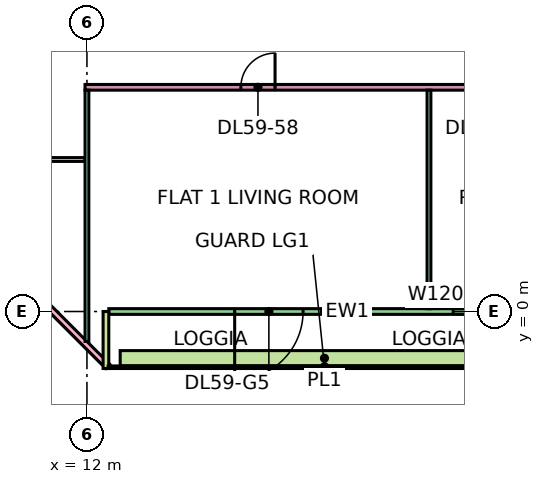
"""IFC4 building model, lengths in metres.
Left out: names, types, materials, properties, quantities, classifications, styles, units other than length and angle.
Written with IfcOpenShell. Run it as: python <this file> out.ifc"""

import sys

from ifc_helpers import new_model, si_unit, direction, frame, frame_2d, origin, place, context, subcontext, project, spatial, rectangle, extrude, element, fill, save


model = new_model("IFC4")
c1 = context("Model", 3, precision=1e-05, world=origin(), true_north=direction((0.0, 1.0)))
c2 = subcontext(c1, "Body", "Model", "MODEL_VIEW")
j1 = project(units=[si_unit("LENGTHUNIT", "METRE"), si_unit("PLANEANGLEUNIT", "RADIAN")], contexts=[c1])
p1 = place(None, origin())
s1 = spatial("IfcSite", under=j1, at=p1, CompositionType="ELEMENT")
p2 = place(p1, origin())
s2 = spatial("IfcBuilding", under=s1, at=p2, CompositionType="ELEMENT")
p3 = place(p2, frame((0.0, 0.0, 249.15)))
s3 = spatial("IfcBuildingStorey", under=s2, at=p3, CompositionType="ELEMENT", Elevation=249.15)
p4 = place(p3, frame((-1.447, 12.553, 0.0), z_axis=(0.0, 0.0, 1.0), x_axis=(0.707106781187, -0.707106781187, 0.0)))
e1 = element("IfcWall", 1, at=p4, inside=s3, PredefinedType="SOLIDWALL", context=c2, shape_type="SweptSolid", body=[
    extrude(rectangle(XDim=19.799, YDim=0.15, at=frame_2d((9.899, 0.0))), origin(), (0.0, 0.0, 1.0), 3.35),
])
p5 = place(p4, frame((2.212, 0.0, 0.45)))
e2 = element("IfcOpeningElement", 2, at=p5, cuts=e1, PredefinedType="OPENING", context=c2, shape_type="SweptSolid", body=[
    extrude(rectangle(XDim=3.0, YDim=2.4, at=frame_2d((1.5, 1.2))), frame((0.0, 0.085, 0.0), z_axis=(0.0, -1.0, 0.0), x_axis=(1.0, 0.0, 0.0)), (0.0, 0.0, 1.0), 0.17),
])
p6 = place(p4, frame((10.216, 0.0, 0.45)))
e3 = element("IfcOpeningElement", 3, at=p6, cuts=e1, PredefinedType="OPENING", context=c2, shape_type="SweptSolid", body=[
    extrude(rectangle(XDim=3.0, YDim=2.4, at=frame_2d((1.5, 1.2))), frame((0.0, 0.085, 0.0), z_axis=(0.0, -1.0, 0.0), x_axis=(1.0, 0.0, 0.0)), (0.0, 0.0, 1.0), 0.17),
])
p7 = place(p3, frame((12.575, 0.0, 0.0), z_axis=(0.0, 0.0, 1.0), x_axis=(1.0, 0.0, 0.0)))
e4 = element("IfcWall", 4, at=p7, inside=s3, PredefinedType="SOLIDWALL", context=c2, shape_type="SweptSolid", body=[
    extrude(rectangle(XDim=11.35, YDim=0.15, at=frame_2d((5.675, 0.0))), origin(), (0.0, 0.0, 1.0), 3.35),
])
p8 = place(p7, frame((3.312, 0.0, 0.0)))
e5 = element("IfcOpeningElement", 5, at=p8, cuts=e4, PredefinedType="OPENING", context=c2, shape_type="SweptSolid", body=[
    extrude(rectangle(XDim=1.8, YDim=2.4, at=frame_2d((0.9, 1.2))), frame((0.0, 0.085, 0.0), z_axis=(0.0, -1.0, 0.0), x_axis=(1.0, 0.0, 0.0)), (0.0, 0.0, 1.0), 0.17),
])
p9 = place(p7, frame((9.062, 0.0, 0.45)))
e6 = element("IfcOpeningElement", 6, at=p9, cuts=e4, PredefinedType="OPENING", context=c2, shape_type="SweptSolid", body=[
    extrude(rectangle(XDim=1.2, YDim=2.4, at=frame_2d((0.6, 1.2))), frame((0.0, 0.085, 0.0), z_axis=(0.0, -1.0, 0.0), x_axis=(1.0, 0.0, 0.0)), (0.0, 0.0, 1.0), 0.17),
])
p10 = place(p3, frame((12.5, -1.5, 0.0), z_axis=(0.0, 0.0, 1.0), x_axis=(0.0, 1.0, 0.0)))
e7 = element("IfcWall", 7, at=p10, inside=s3, PredefinedType="SOLIDWALL", context=c2, shape_type="SweptSolid", body=[
    extrude(rectangle(XDim=1.5, YDim=0.15, at=frame_2d((0.75, 0.0))), origin(), (0.0, 0.0, 1.0), 3.35),
])
p11 = place(p3, frame((12.875, -1.229, 0.0), z_axis=(0.0, 0.0, 1.0), x_axis=(1.0, 0.0, 0.0)))
e8 = element("IfcWall", 8, at=p11, inside=s3, PredefinedType="SOLIDWALL", context=c2, shape_type="SweptSolid", body=[
    extrude(rectangle(XDim=10.75, YDim=0.4, at=frame_2d((5.375, 0.0))), origin(), (0.0, 0.0, 1.0), 0.7),
])
p12 = place(p3, frame((9.05, 4.0, 0.0), z_axis=(0.0, 0.0, 1.0), x_axis=(1.0, 0.0, 0.0)))
e9 = element("IfcWall", 9, at=p12, inside=s3, PredefinedType="PARTITIONING", context=c2, shape_type="SweptSolid", body=[
    extrude(rectangle(XDim=2.9, YDim=0.1, at=frame_2d((1.45, 0.0))), origin(), (0.0, 0.0, 1.0), 3.35),
])
p13 = place(p3, frame((11.95, 5.9, 0.0), z_axis=(0.0, 0.0, 1.0), x_axis=(1.0, 0.0, 0.0)))
e10 = element("IfcWall", 10, at=p13, inside=s3, PredefinedType="PARTITIONING", context=c2, shape_type="SweptSolid", body=[
    extrude(rectangle(XDim=21.1, YDim=0.15, at=frame_2d((10.55, 0.0))), origin(), (0.0, 0.0, 1.0), 3.35),
])
p14 = place(p13, frame((10.1, 0.0, 0.0)))
e11 = element("IfcOpeningElement", 11, at=p14, cuts=e10, PredefinedType="OPENING", context=c2, shape_type="SweptSolid", body=[
    extrude(rectangle(XDim=0.9, YDim=2.1, at=frame_2d((0.45, 1.05))), frame((0.0, 0.085, 0.0), z_axis=(0.0, -1.0, 0.0), x_axis=(1.0, 0.0, 0.0)), (0.0, 0.0, 1.0), 0.17),
])
p15 = place(p13, frame((16.1, 0.0, 0.0)))
e12 = element("IfcOpeningElement", 12, at=p15, cuts=e10, PredefinedType="OPENING", context=c2, shape_type="SweptSolid", body=[
    extrude(rectangle(XDim=0.9, YDim=2.1, at=frame_2d((0.45, 1.05))), frame((0.0, 0.085, 0.0), z_axis=(0.0, -1.0, 0.0), x_axis=(1.0, 0.0, 0.0)), (0.0, 0.0, 1.0), 0.17),
])
p16 = place(p13, frame((4.1, 0.0, 0.0)))
e13 = element("IfcOpeningElement", 13, at=p16, cuts=e10, PredefinedType="OPENING", context=c2, shape_type="SweptSolid", body=[
    extrude(rectangle(XDim=0.9, YDim=2.1, at=frame_2d((0.45, 1.05))), frame((0.0, 0.085, 0.0), z_axis=(0.0, -1.0, 0.0), x_axis=(1.0, 0.0, 0.0)), (0.0, 0.0, 1.0), 0.17),
])
p17 = place(p3, frame((12.0, -0.788, 0.0), z_axis=(0.0, 0.0, 1.0), x_axis=(0.0, 1.0, 0.0)))
e14 = element("IfcWall", 14, at=p17, inside=s3, PredefinedType="PARTITIONING", context=c2, shape_type="SweptSolid", body=[
    extrude(rectangle(XDim=6.613, YDim=0.1, at=frame_2d((3.306, 0.0))), origin(), (0.0, 0.0, 1.0), 3.35),
])
p18 = place(p3, frame((21.0, 0.074, 0.0), z_axis=(0.0, 0.0, 1.0), x_axis=(0.0, 1.0, 0.0)))
e15 = element("IfcWall", 15, at=p18, inside=s3, PredefinedType="PARTITIONING", context=c2, shape_type="SweptSolid", body=[
    extrude(rectangle(XDim=5.751, YDim=0.1, at=frame_2d((2.875, 0.0))), origin(), (0.0, 0.0, 1.0), 3.35),
])
p19 = place(p8, frame((1.8, 0.0, 0.0), z_axis=(0.0, 0.0, 1.0), x_axis=(-1.0, 0.0, 0.0)))
e16 = element("IfcDoor", 16, at=p19, inside=s3, OperationType="DOUBLE_DOOR_SINGLE_SWING", PredefinedType="DOOR", context=c2, shape_type="SweptSolid", body=[
    extrude(rectangle(XDim=1.8, YDim=2.4, at=frame_2d((0.9, 1.2))), frame((0.0, 0.025, 0.0), z_axis=(0.0, -1.0, 0.0), x_axis=(1.0, 0.0, 0.0)), (0.0, 0.0, 1.0), 0.05),
])
fill(e5, e16)
p20 = place(p9, origin())
e17 = element("IfcWindow", 17, at=p20, inside=s3, PartitioningType="SINGLE_PANEL", PredefinedType="WINDOW", context=c2, shape_type="SweptSolid", body=[
    extrude(rectangle(XDim=1.2, YDim=2.4, at=frame_2d((0.6, 1.2))), frame((0.0, 0.03, 0.0), z_axis=(0.0, -1.0, 0.0), x_axis=(1.0, 0.0, 0.0)), (0.0, 0.0, 1.0), 0.06),
])
fill(e6, e17)
p21 = place(p16, frame((0.9, 0.0, 0.0), z_axis=(0.0, 0.0, 1.0), x_axis=(-1.0, 0.0, 0.0)))
e18 = element("IfcDoor", 18, at=p21, inside=s3, OperationType="SINGLE_SWING_RIGHT", PredefinedType="DOOR", context=c2, shape_type="SweptSolid", body=[
    extrude(rectangle(XDim=0.9, YDim=2.1, at=frame_2d((0.45, 1.05))), frame((0.0, 0.025, 0.0), z_axis=(0.0, -1.0, 0.0), x_axis=(1.0, 0.0, 0.0)), (0.0, 0.0, 1.0), 0.05),
])
fill(e13, e18)
save(model, sys.argv[1])
